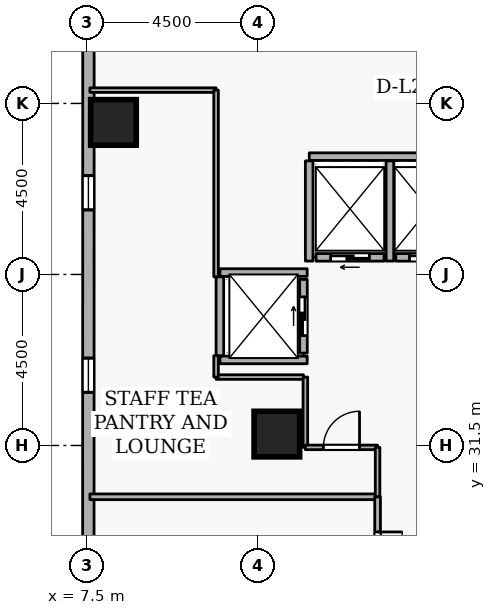
"""IFC4 building model, lengths in metres.
Left out: names, types, materials, properties, quantities, classifications, styles, units other than length and angle.
Written with IfcOpenShell. Run it as: python <this file> out.ifc"""

import sys

from ifc_helpers import new_model, si_unit, direction, frame, frame_2d, origin, origin_2d, place, context, subcontext, project, spatial, rectangle, extrude, element, fill, save


model = new_model("IFC4")
c1 = context("Model", 3, precision=1e-05, world=origin(), true_north=direction((0.0, 1.0)))
c2 = subcontext(c1, "Body", "Model", "MODEL_VIEW")
j1 = project(units=[si_unit("LENGTHUNIT", "METRE"), si_unit("PLANEANGLEUNIT", "RADIAN")], contexts=[c1])
p1 = place(None, origin())
s1 = spatial("IfcSite", under=j1, at=p1, CompositionType="ELEMENT")
p2 = place(p1, origin())
s2 = spatial("IfcBuilding", under=s1, at=p2, CompositionType="ELEMENT")
p3 = place(p2, frame((0.0, 0.0, 90.9)))
s3 = spatial("IfcBuildingStorey", under=s2, at=p3, CompositionType="ELEMENT", Elevation=90.9)
for number, where, z_axis, x_axis in (
    (1, (8.2, 40.0, 0.0), (0.0, 0.0, 1.0), (1.0, 0.0, 0.0)),
    (2, (12.5, 31.8, 0.0), (0.0, 0.0, 1.0), (1.0, 0.0, 0.0)),
):
    element("IfcColumn", number, at=place(p3, frame(where, z_axis=z_axis, x_axis=x_axis)), inside=s3, PredefinedType="COLUMN", context=c2, shape_type="SweptSolid", body=[
        extrude(rectangle(XDim=1.2, YDim=1.2, at=origin_2d()), origin(), (0.0, 0.0, 1.0), 3.6),
    ])
p4 = place(p3, frame((7.543, 46.099, 0.0), z_axis=(0.0, 0.0, 1.0), x_axis=(-0.000212414941, -0.99999997744, 0.0)))
e3 = element("IfcWall", 3, at=p4, inside=s3, PredefinedType="STANDARD", context=c2, shape_type="SweptSolid", body=[
    extrude(rectangle(XDim=34.481, YDim=0.3, at=frame_2d((17.24, 0.0))), origin(), (0.0, 0.0, 1.0), 2.7),
])
p5 = place(p4, frame((7.5, 0.0, 0.72)))
e4 = element("IfcOpeningElement", 4, at=p5, cuts=e3, PredefinedType="OPENING", context=c2, shape_type="SweptSolid", body=[
    extrude(rectangle(XDim=0.9, YDim=1.75, at=frame_2d((0.45, 0.875))), frame((0.0, 0.16, 0.0), z_axis=(0.0, -1.0, 0.0), x_axis=(1.0, 0.0, 0.0)), (0.0, 0.0, 1.0), 0.32),
])
p6 = place(p4, frame((12.3, 0.0, 0.72)))
e5 = element("IfcOpeningElement", 5, at=p6, cuts=e3, PredefinedType="OPENING", context=c2, shape_type="SweptSolid", body=[
    extrude(rectangle(XDim=0.9, YDim=1.75, at=frame_2d((0.45, 0.875))), frame((0.0, 0.16, 0.0), z_axis=(0.0, -1.0, 0.0), x_axis=(1.0, 0.0, 0.0)), (0.0, 0.0, 1.0), 0.32),
])
p7 = place(p4, frame((17.1, 0.0, 0.72)))
e6 = element("IfcOpeningElement", 6, at=p7, cuts=e3, PredefinedType="OPENING", context=c2, shape_type="SweptSolid", body=[
    extrude(rectangle(XDim=0.9, YDim=1.75, at=frame_2d((0.45, 0.875))), frame((0.0, 0.16, 0.0), z_axis=(0.0, -1.0, 0.0), x_axis=(1.0, 0.0, 0.0)), (0.0, 0.0, 1.0), 0.32),
])
p8 = place(p4, frame((21.9, 0.0, 0.72)))
e7 = element("IfcOpeningElement", 7, at=p8, cuts=e3, PredefinedType="OPENING", context=c2, shape_type="SweptSolid", body=[
    extrude(rectangle(XDim=0.9, YDim=1.75, at=frame_2d((0.45, 0.875))), frame((0.0, 0.16, 0.0), z_axis=(0.0, -1.0, 0.0), x_axis=(1.0, 0.0, 0.0)), (0.0, 0.0, 1.0), 0.32),
])
p9 = place(p4, frame((26.7, 0.0, 0.72)))
e8 = element("IfcOpeningElement", 8, at=p9, cuts=e3, PredefinedType="OPENING", context=c2, shape_type="SweptSolid", body=[
    extrude(rectangle(XDim=0.9, YDim=1.75, at=frame_2d((0.45, 0.875))), frame((0.0, 0.16, 0.0), z_axis=(0.0, -1.0, 0.0), x_axis=(1.0, 0.0, 0.0)), (0.0, 0.0, 1.0), 0.32),
])
p10 = place(p3, frame((17.37, 36.45, 0.0), z_axis=(0.0, 0.0, 1.0), x_axis=(-1.0, 0.0, 0.0)))
e9 = element("IfcWall", 9, at=p10, inside=s3, PredefinedType="STANDARD", context=c2, shape_type="SweptSolid", body=[
    extrude(rectangle(XDim=1.74, YDim=0.2, at=frame_2d((0.87, 0.0))), origin(), (0.0, 0.0, 1.0), 3.34),
])
p11 = place(p10, frame((0.36, 0.0, 0.0)))
e10 = element("IfcOpeningElement", 10, at=p11, cuts=e9, PredefinedType="OPENING", context=c2, shape_type="SweptSolid", body=[
    extrude(rectangle(XDim=1.02, YDim=2.06, at=frame_2d((0.51, 1.03))), frame((0.0, 0.11, 0.0), z_axis=(0.0, -1.0, 0.0), x_axis=(1.0, 0.0, 0.0)), (0.0, 0.0, 1.0), 0.22),
])
p12 = place(p3, frame((15.32, 36.45, 0.0), z_axis=(0.0, 0.0, 1.0), x_axis=(-1.0, 0.0, 0.0)))
e11 = element("IfcWall", 11, at=p12, inside=s3, PredefinedType="STANDARD", context=c2, shape_type="SweptSolid", body=[
    extrude(rectangle(XDim=1.79, YDim=0.2, at=frame_2d((0.895, 0.0))), origin(), (0.0, 0.0, 1.0), 3.34),
])
p13 = place(p12, frame((0.385, 0.0, 0.0)))
e12 = element("IfcOpeningElement", 12, at=p13, cuts=e11, PredefinedType="OPENING", context=c2, shape_type="SweptSolid", body=[
    extrude(rectangle(XDim=1.02, YDim=2.06, at=frame_2d((0.51, 1.03))), frame((0.0, 0.11, 0.0), z_axis=(0.0, -1.0, 0.0), x_axis=(1.0, 0.0, 0.0)), (0.0, 0.0, 1.0), 0.22),
])
p14 = place(p3, frame((13.2, 33.93, 0.0), z_axis=(0.0, 0.0, 1.0), x_axis=(0.0, 1.0, 0.0)))
e13 = element("IfcWall", 13, at=p14, inside=s3, PredefinedType="STANDARD", context=c2, shape_type="SweptSolid", body=[
    extrude(rectangle(XDim=1.94, YDim=0.2, at=frame_2d((0.97, 0.0))), origin(), (0.0, 0.0, 1.0), 3.34),
])
p15 = place(p14, frame((0.46, 0.0, 0.0)))
e14 = element("IfcOpeningElement", 14, at=p15, cuts=e13, PredefinedType="OPENING", context=c2, shape_type="SweptSolid", body=[
    extrude(rectangle(XDim=1.02, YDim=2.06, at=frame_2d((0.51, 1.03))), frame((0.0, 0.11, 0.0), z_axis=(0.0, -1.0, 0.0), x_axis=(1.0, 0.0, 0.0)), (0.0, 0.0, 1.0), 0.22),
])
p16 = place(p3, frame((13.352, 39.1, 0.0), z_axis=(0.0, 0.0, 1.0), x_axis=(1.0, 0.0, 0.0)))
e15 = element("IfcWall", 15, at=p16, inside=s3, PredefinedType="STANDARD", context=c2, shape_type="SweptSolid", body=[
    extrude(rectangle(XDim=4.196, YDim=0.2, at=frame_2d((2.098, 0.0))), origin(), (0.0, 0.0, 1.0), 3.34),
])
for number, where, z_axis, x_axis in (
    (16, (15.475, 36.352, 0.0), (0.0, 0.0, 1.0), (0.0, 1.0, 0.0)),
    (17, (13.35, 36.352, 0.0), (0.0, 0.0, 1.0), (0.0, 1.0, 0.0)),
):
    element("IfcWall", number, at=place(p3, frame(where, z_axis=z_axis, x_axis=x_axis)), inside=s3, PredefinedType="STANDARD", context=c2, shape_type="SweptSolid", body=[
        extrude(rectangle(XDim=2.636, YDim=0.2, at=frame_2d((1.318, 0.0))), origin(), (0.0, 0.0, 1.0), 3.34),
    ])
for number, where, z_axis, x_axis in (
    (18, (11.002, 36.05, 0.0), (0.0, 0.0, 1.0), (1.0, 0.0, 0.0)),
    (19, (11.002, 33.75, 0.0), (0.0, 0.0, 1.0), (1.0, 0.0, 0.0)),
):
    element("IfcWall", number, at=place(p3, frame(where, z_axis=z_axis, x_axis=x_axis)), inside=s3, PredefinedType="STANDARD", context=c2, shape_type="SweptSolid", body=[
        extrude(rectangle(XDim=2.296, YDim=0.2, at=frame_2d((1.148, 0.0))), origin(), (0.0, 0.0, 1.0), 3.34),
    ])
p17 = place(p3, frame((11.0, 33.862, 0.0), z_axis=(0.0, 0.0, 1.0), x_axis=(0.0, 1.0, 0.0)))
e20 = element("IfcWall", 20, at=p17, inside=s3, PredefinedType="STANDARD", context=c2, shape_type="SweptSolid", body=[
    extrude(rectangle(XDim=2.076, YDim=0.2, at=frame_2d((1.038, 0.0))), origin(), (0.0, 0.0, 1.0), 3.34),
])
p18 = place(p3, frame((7.58, 30.15, 0.0), z_axis=(0.0, 0.0, 1.0), x_axis=(1.0, 0.0, 0.0)))
e21 = element("IfcWall", 21, at=p18, inside=s3, PredefinedType="PARTITIONING", context=c2, shape_type="SweptSolid", body=[
    extrude(rectangle(XDim=7.57, YDim=0.15, at=frame_2d((3.785, 0.0))), origin(), (0.0, 0.0, 1.0), 3.34),
])
p19 = place(p3, frame((15.15, 30.15, 0.0), z_axis=(0.0, 0.0, 1.0), x_axis=(0.0, -1.0, 0.0)))
e22 = element("IfcWall", 22, at=p19, inside=s3, PredefinedType="PARTITIONING", context=c2, shape_type="SweptSolid", body=[
    extrude(rectangle(XDim=3.15, YDim=0.15, at=frame_2d((1.575, 0.0))), origin(), (0.0, 0.0, 1.0), 3.34),
])
p20 = place(p19, frame((0.925, 0.0, 0.0)))
e23 = element("IfcOpeningElement", 23, at=p20, cuts=e22, PredefinedType="OPENING", context=c2, shape_type="SweptSolid", body=[
    extrude(rectangle(XDim=1.3, YDim=2.12, at=frame_2d((0.65, 1.06))), frame((0.0, 0.085, 0.0), z_axis=(0.0, -1.0, 0.0), x_axis=(1.0, 0.0, 0.0)), (0.0, 0.0, 1.0), 0.17),
])
p21 = place(p3, frame((10.9, 33.3, 0.0), z_axis=(0.0, 0.0, 1.0), x_axis=(1.0, 0.0, 0.0)))
e24 = element("IfcWall", 24, at=p21, inside=s3, PredefinedType="PARTITIONING", context=c2, shape_type="SweptSolid", body=[
    extrude(rectangle(XDim=2.3, YDim=0.12, at=frame_2d((1.15, 0.0))), origin(), (0.0, 0.0, 1.0), 3.34),
])
p22 = place(p3, frame((13.25, 33.3, 0.0), z_axis=(0.0, 0.0, 1.0), x_axis=(0.0, -1.0, 0.0)))
e25 = element("IfcWall", 25, at=p22, inside=s3, PredefinedType="PARTITIONING", context=c2, shape_type="SweptSolid", body=[
    extrude(rectangle(XDim=1.85, YDim=0.12, at=frame_2d((0.925, 0.0))), origin(), (0.0, 0.0, 1.0), 3.34),
])
p23 = place(p3, frame((13.25, 31.45, 0.0), z_axis=(0.0, 0.0, 1.0), x_axis=(1.0, 0.0, 0.0)))
e26 = element("IfcWall", 26, at=p23, inside=s3, PredefinedType="PARTITIONING", context=c2, shape_type="SweptSolid", body=[
    extrude(rectangle(XDim=1.9, YDim=0.12, at=frame_2d((0.95, 0.0))), origin(), (0.0, 0.0, 1.0), 3.34),
])
p24 = place(p23, frame((0.475, 0.0, 0.0)))
e27 = element("IfcOpeningElement", 27, at=p24, cuts=e26, PredefinedType="OPENING", context=c2, shape_type="SweptSolid", body=[
    extrude(rectangle(XDim=0.95, YDim=2.1, at=frame_2d((0.475, 1.05))), frame((0.0, 0.07, 0.0), z_axis=(0.0, -1.0, 0.0), x_axis=(1.0, 0.0, 0.0)), (0.0, 0.0, 1.0), 0.14),
])
p25 = place(p3, frame((15.15, 31.45, 0.0), z_axis=(0.0, 0.0, 1.0), x_axis=(0.0, -1.0, 0.0)))
e28 = element("IfcWall", 28, at=p25, inside=s3, PredefinedType="PARTITIONING", context=c2, shape_type="SweptSolid", body=[
    extrude(rectangle(XDim=1.3, YDim=0.12, at=frame_2d((0.65, 0.0))), origin(), (0.0, 0.0, 1.0), 3.34),
])
p26 = place(p3, frame((7.58, 40.85, 0.0), z_axis=(0.0, 0.0, 1.0), x_axis=(1.0, 0.0, 0.0)))
e29 = element("IfcWall", 29, at=p26, inside=s3, PredefinedType="PARTITIONING", context=c2, shape_type="SweptSolid", body=[
    extrude(rectangle(XDim=3.32, YDim=0.12, at=frame_2d((1.66, 0.0))), origin(), (0.0, 0.0, 1.0), 3.34),
])
p27 = place(p3, frame((10.9, 40.85, 0.0), z_axis=(0.0, 0.0, 1.0), x_axis=(0.0, -1.0, 0.0)))
e30 = element("IfcWall", 30, at=p27, inside=s3, PredefinedType="PARTITIONING", context=c2, shape_type="SweptSolid", body=[
    extrude(rectangle(XDim=4.912, YDim=0.12, at=frame_2d((2.456, 0.0))), origin(), (0.0, 0.0, 1.0), 3.34),
])
p28 = place(p3, frame((10.9, 33.862, 0.0), z_axis=(0.0, 0.0, 1.0), x_axis=(0.0, -1.0, 0.0)))
e31 = element("IfcWall", 31, at=p28, inside=s3, PredefinedType="PARTITIONING", context=c2, shape_type="SweptSolid", body=[
    extrude(rectangle(XDim=0.562, YDim=0.12, at=frame_2d((0.281, 0.0))), origin(), (0.0, 0.0, 1.0), 3.34),
])
p29 = place(p5, origin())
e32 = element("IfcWindow", 32, at=p29, inside=s3, PartitioningType="SINGLE_PANEL", PredefinedType="WINDOW", context=c2, shape_type="SweptSolid", body=[
    extrude(rectangle(XDim=0.9, YDim=1.75, at=frame_2d((0.45, 0.875))), frame((0.0, 0.03, 0.0), z_axis=(0.0, -1.0, 0.0), x_axis=(1.0, 0.0, 0.0)), (0.0, 0.0, 1.0), 0.06),
])
fill(e4, e32)
p30 = place(p6, origin())
e33 = element("IfcWindow", 33, at=p30, inside=s3, PartitioningType="SINGLE_PANEL", PredefinedType="WINDOW", context=c2, shape_type="SweptSolid", body=[
    extrude(rectangle(XDim=0.9, YDim=1.75, at=frame_2d((0.45, 0.875))), frame((0.0, 0.03, 0.0), z_axis=(0.0, -1.0, 0.0), x_axis=(1.0, 0.0, 0.0)), (0.0, 0.0, 1.0), 0.06),
])
fill(e5, e33)
p31 = place(p11, origin())
e34 = element("IfcDoor", 34, at=p31, inside=s3, OperationType="SLIDING_TO_LEFT", PredefinedType="DOOR", context=c2, shape_type="SweptSolid", body=[
    extrude(rectangle(XDim=1.02, YDim=2.06, at=frame_2d((0.51, 1.03))), frame((0.0, 0.025, 0.0), z_axis=(0.0, -1.0, 0.0), x_axis=(1.0, 0.0, 0.0)), (0.0, 0.0, 1.0), 0.05),
])
fill(e10, e34)
p32 = place(p13, origin())
e35 = element("IfcDoor", 35, at=p32, inside=s3, OperationType="SLIDING_TO_LEFT", PredefinedType="DOOR", context=c2, shape_type="SweptSolid", body=[
    extrude(rectangle(XDim=1.02, YDim=2.06, at=frame_2d((0.51, 1.03))), frame((0.0, 0.025, 0.0), z_axis=(0.0, -1.0, 0.0), x_axis=(1.0, 0.0, 0.0)), (0.0, 0.0, 1.0), 0.05),
])
fill(e12, e35)
p33 = place(p15, origin())
e36 = element("IfcDoor", 36, at=p33, inside=s3, OperationType="SLIDING_TO_LEFT", PredefinedType="DOOR", context=c2, shape_type="SweptSolid", body=[
    extrude(rectangle(XDim=1.02, YDim=2.06, at=frame_2d((0.51, 1.03))), frame((0.0, 0.025, 0.0), z_axis=(0.0, -1.0, 0.0), x_axis=(1.0, 0.0, 0.0)), (0.0, 0.0, 1.0), 0.05),
])
fill(e14, e36)
p34 = place(p20, origin())
e37 = element("IfcDoor", 37, at=p34, inside=s3, OperationType="DOUBLE_DOOR_SINGLE_SWING", PredefinedType="DOOR", context=c2, shape_type="SweptSolid", body=[
    extrude(rectangle(XDim=1.3, YDim=2.12, at=frame_2d((0.65, 1.06))), frame((0.0, 0.025, 0.0), z_axis=(0.0, -1.0, 0.0), x_axis=(1.0, 0.0, 0.0)), (0.0, 0.0, 1.0), 0.05),
])
fill(e23, e37)
p35 = place(p24, origin())
e38 = element("IfcDoor", 38, at=p35, inside=s3, OperationType="SINGLE_SWING_RIGHT", PredefinedType="DOOR", context=c2, shape_type="SweptSolid", body=[
    extrude(rectangle(XDim=0.95, YDim=2.1, at=frame_2d((0.475, 1.05))), frame((0.0, 0.025, 0.0), z_axis=(0.0, -1.0, 0.0), x_axis=(1.0, 0.0, 0.0)), (0.0, 0.0, 1.0), 0.05),
])
fill(e27, e38)
save(model, sys.argv[1])
